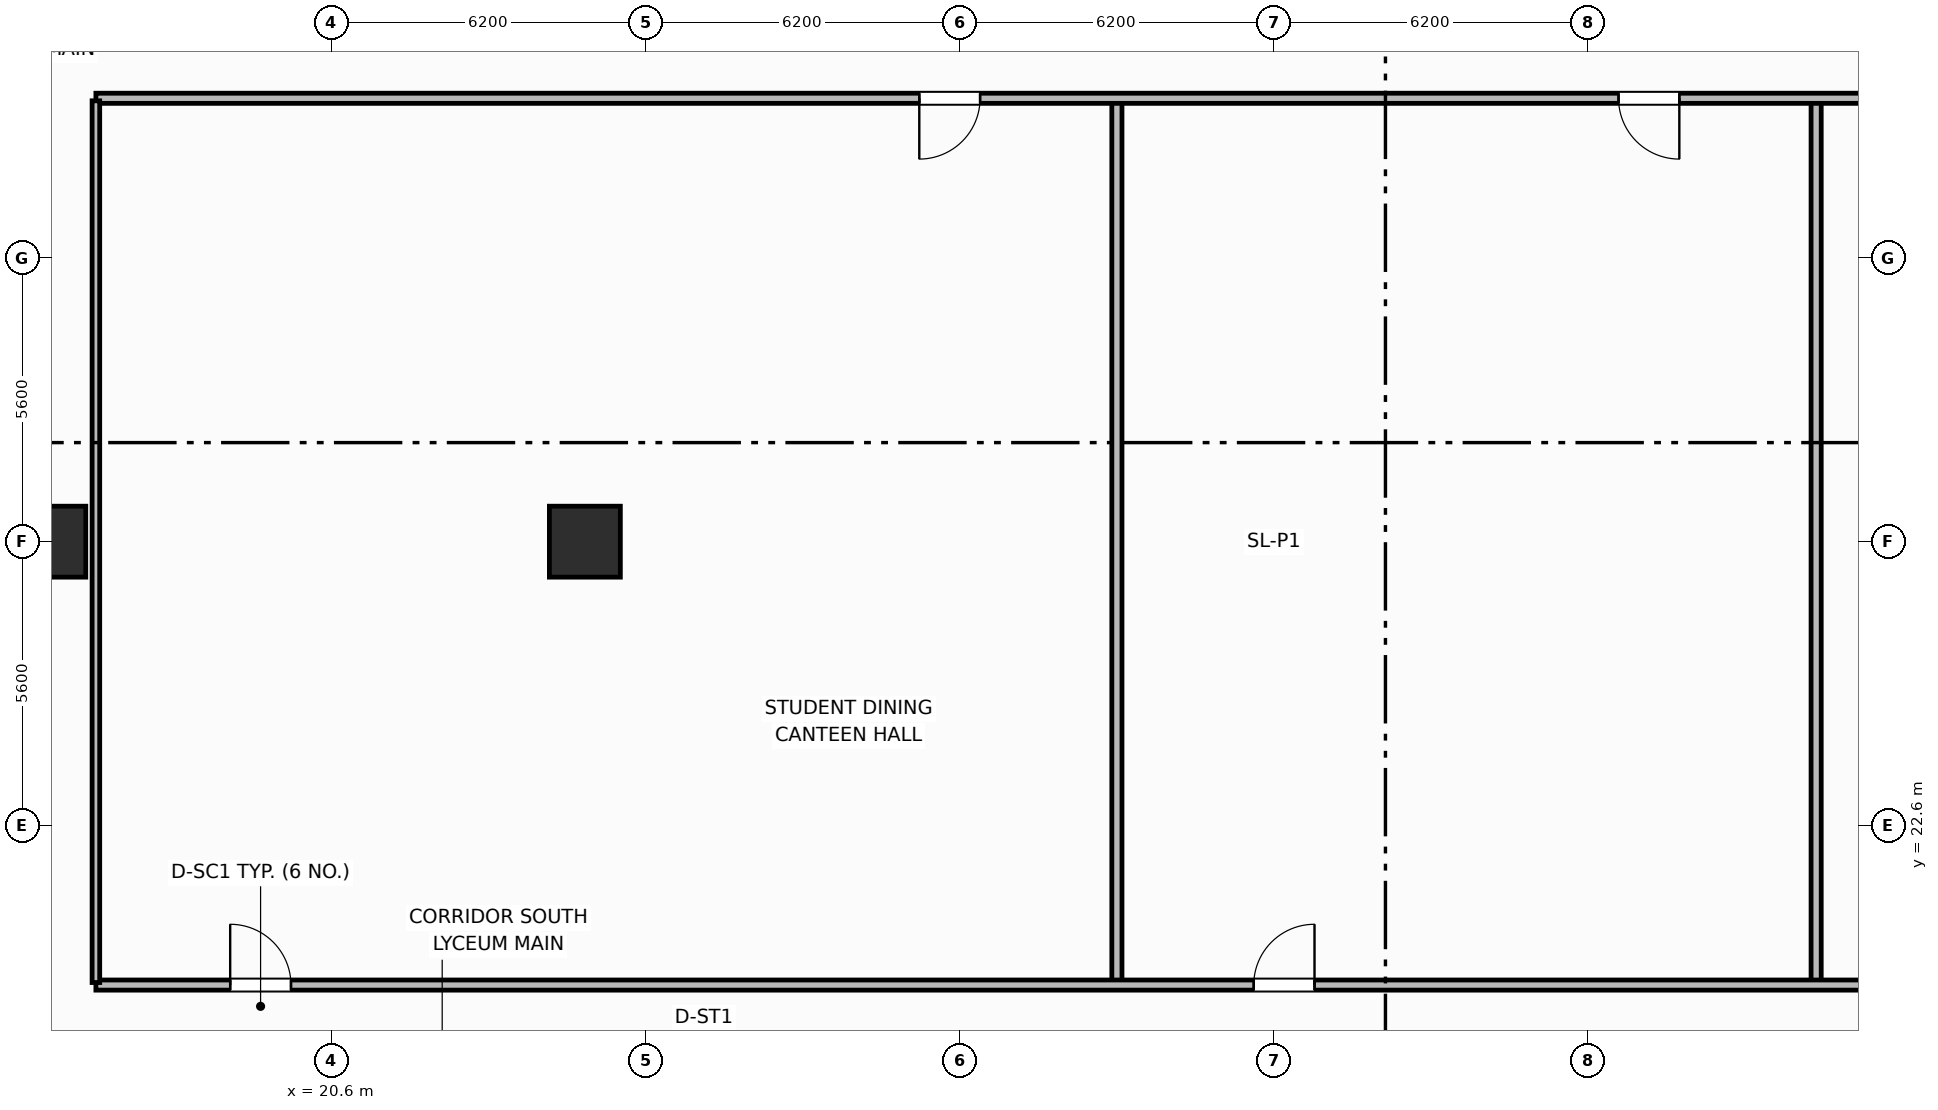
"""IFC4 building model, lengths in metres.
Left out: names, types, materials, properties, quantities, classifications, styles, units other than length and angle.
Written with IfcOpenShell. Run it as: python <this file> out.ifc"""

import sys

from ifc_helpers import new_model, si_unit, direction, frame, frame_2d, origin, origin_2d, place, context, subcontext, project, spatial, rectangle, extrude, element, fill, save


model = new_model("IFC4")
c1 = context("Model", 3, precision=1e-05, world=origin(), true_north=direction((0.0, 1.0)))
c2 = subcontext(c1, "Body", "Model", "MODEL_VIEW")
j1 = project(units=[si_unit("LENGTHUNIT", "METRE"), si_unit("PLANEANGLEUNIT", "RADIAN")], contexts=[c1])
p1 = place(None, origin())
s1 = spatial("IfcSite", under=j1, at=p1, CompositionType="ELEMENT")
p2 = place(p1, origin())
s2 = spatial("IfcBuilding", under=s1, at=p2, CompositionType="ELEMENT")
p3 = place(p2, frame((0.0, 0.0, 6.6)))
s3 = spatial("IfcBuildingStorey", under=s2, at=p3, CompositionType="ELEMENT", Elevation=6.6)
for number, where, z_axis, x_axis in (
    (1, (25.6, 28.2, 0.0), (0.0, 0.0, 1.0), (1.0, 0.0, 0.0)),
    (2, (15.05, 28.2, 0.0), (0.0, 0.0, 1.0), (1.0, 0.0, 0.0)),
):
    element("IfcColumn", number, at=place(p3, frame(where, z_axis=z_axis, x_axis=x_axis)), inside=s3, PredefinedType="COLUMN", context=c2, shape_type="SweptSolid", body=[
        extrude(rectangle(XDim=1.4, YDim=1.4, at=origin_2d()), origin(), (0.0, 0.0, 1.0), 4.5),
    ])
for number, where, z_axis, x_axis in (
    (3, (36.1, 19.5, 0.0), (0.0, 0.0, 1.0), (0.0, 1.0, 0.0)),
    (4, (49.9, 19.5, 0.0), (0.0, 0.0, 1.0), (0.0, 1.0, 0.0)),
):
    element("IfcWall", number, at=place(p3, frame(where, z_axis=z_axis, x_axis=x_axis)), inside=s3, PredefinedType="PARTITIONING", context=c2, shape_type="SweptSolid", body=[
        extrude(rectangle(XDim=17.4, YDim=0.2, at=frame_2d((8.7, 0.0))), origin(), (0.0, 0.0, 1.0), 3.42),
    ])
p4 = place(p3, frame((15.95, 19.45, 0.0), z_axis=(0.0, 0.0, 1.0), x_axis=(1.0, 0.0, 0.0)))
e5 = element("IfcWall", 5, at=p4, inside=s3, PredefinedType="PARTITIONING", context=c2, shape_type="SweptSolid", body=[
    extrude(rectangle(XDim=46.5, YDim=0.2, at=frame_2d((23.25, 0.0))), origin(), (0.0, 0.0, 1.0), 3.42),
])
p5 = place(p4, frame((2.65, 0.0, 0.0)))
e6 = element("IfcOpeningElement", 6, at=p5, cuts=e5, PredefinedType="OPENING", context=c2, shape_type="SweptSolid", body=[
    extrude(rectangle(XDim=1.2, YDim=2.15, at=frame_2d((0.6, 1.075))), frame((0.0, 0.11, 0.0), z_axis=(0.0, -1.0, 0.0), x_axis=(1.0, 0.0, 0.0)), (0.0, 0.0, 1.0), 0.22),
])
p6 = place(p4, frame((22.85, 0.0, 0.0)))
e7 = element("IfcOpeningElement", 7, at=p6, cuts=e5, PredefinedType="OPENING", context=c2, shape_type="SweptSolid", body=[
    extrude(rectangle(XDim=1.2, YDim=2.15, at=frame_2d((0.6, 1.075))), frame((0.0, 0.11, 0.0), z_axis=(0.0, -1.0, 0.0), x_axis=(1.0, 0.0, 0.0)), (0.0, 0.0, 1.0), 0.22),
])
p7 = place(p4, frame((36.65, 0.0, 0.0)))
e8 = element("IfcOpeningElement", 8, at=p7, cuts=e5, PredefinedType="OPENING", context=c2, shape_type="SweptSolid", body=[
    extrude(rectangle(XDim=1.2, YDim=2.15, at=frame_2d((0.6, 1.075))), frame((0.0, 0.11, 0.0), z_axis=(0.0, -1.0, 0.0), x_axis=(1.0, 0.0, 0.0)), (0.0, 0.0, 1.0), 0.22),
])
p8 = place(p3, frame((62.45, 36.95, 0.0), z_axis=(0.0, 0.0, 1.0), x_axis=(-1.0, 0.0, 0.0)))
e9 = element("IfcWall", 9, at=p8, inside=s3, PredefinedType="PARTITIONING", context=c2, shape_type="SweptSolid", body=[
    extrude(rectangle(XDim=46.5, YDim=0.2, at=frame_2d((23.25, 0.0))), origin(), (0.0, 0.0, 1.0), 3.42),
])
p9 = place(p8, frame((29.05, 0.0, 0.0)))
e10 = element("IfcOpeningElement", 10, at=p9, cuts=e9, PredefinedType="OPENING", context=c2, shape_type="SweptSolid", body=[
    extrude(rectangle(XDim=1.2, YDim=2.15, at=frame_2d((0.6, 1.075))), frame((0.0, 0.11, 0.0), z_axis=(0.0, -1.0, 0.0), x_axis=(1.0, 0.0, 0.0)), (0.0, 0.0, 1.0), 0.22),
])
p10 = place(p8, frame((15.25, 0.0, 0.0)))
e11 = element("IfcOpeningElement", 11, at=p10, cuts=e9, PredefinedType="OPENING", context=c2, shape_type="SweptSolid", body=[
    extrude(rectangle(XDim=1.2, YDim=2.15, at=frame_2d((0.6, 1.075))), frame((0.0, 0.11, 0.0), z_axis=(0.0, -1.0, 0.0), x_axis=(1.0, 0.0, 0.0)), (0.0, 0.0, 1.0), 0.22),
])
p11 = place(p8, frame((2.65, 0.0, 0.0)))
e12 = element("IfcOpeningElement", 12, at=p11, cuts=e9, PredefinedType="OPENING", context=c2, shape_type="SweptSolid", body=[
    extrude(rectangle(XDim=1.2, YDim=2.15, at=frame_2d((0.6, 1.075))), frame((0.0, 0.11, 0.0), z_axis=(0.0, -1.0, 0.0), x_axis=(1.0, 0.0, 0.0)), (0.0, 0.0, 1.0), 0.22),
])
p12 = place(p3, frame((15.95, 19.5, 0.0), z_axis=(0.0, 0.0, 1.0), x_axis=(0.0, 1.0, 0.0)))
e13 = element("IfcWall", 13, at=p12, inside=s3, PredefinedType="PARTITIONING", context=c2, shape_type="SweptSolid", body=[
    extrude(rectangle(XDim=17.4, YDim=0.15, at=frame_2d((8.7, 0.0))), origin(), (0.0, 0.0, 1.0), 3.42),
])
p13 = place(p5, origin())
e14 = element("IfcDoor", 14, at=p13, inside=s3, OperationType="SINGLE_SWING_LEFT", PredefinedType="DOOR", context=c2, shape_type="SweptSolid", body=[
    extrude(rectangle(XDim=1.2, YDim=2.15, at=frame_2d((0.6, 1.075))), frame((0.0, 0.025, 0.0), z_axis=(0.0, -1.0, 0.0), x_axis=(1.0, 0.0, 0.0)), (0.0, 0.0, 1.0), 0.05),
])
fill(e6, e14)
p14 = place(p6, origin())
e15 = element("IfcDoor", 15, at=p14, inside=s3, OperationType="SINGLE_SWING_RIGHT", PredefinedType="DOOR", context=c2, shape_type="SweptSolid", body=[
    extrude(rectangle(XDim=1.2, YDim=2.15, at=frame_2d((0.6, 1.075))), frame((0.0, 0.025, 0.0), z_axis=(0.0, -1.0, 0.0), x_axis=(1.0, 0.0, 0.0)), (0.0, 0.0, 1.0), 0.05),
])
fill(e7, e15)
p15 = place(p9, origin())
e16 = element("IfcDoor", 16, at=p15, inside=s3, OperationType="SINGLE_SWING_RIGHT", PredefinedType="DOOR", context=c2, shape_type="SweptSolid", body=[
    extrude(rectangle(XDim=1.2, YDim=2.15, at=frame_2d((0.6, 1.075))), frame((0.0, 0.025, 0.0), z_axis=(0.0, -1.0, 0.0), x_axis=(1.0, 0.0, 0.0)), (0.0, 0.0, 1.0), 0.05),
])
fill(e10, e16)
p16 = place(p10, origin())
e17 = element("IfcDoor", 17, at=p16, inside=s3, OperationType="SINGLE_SWING_LEFT", PredefinedType="DOOR", context=c2, shape_type="SweptSolid", body=[
    extrude(rectangle(XDim=1.2, YDim=2.15, at=frame_2d((0.6, 1.075))), frame((0.0, 0.025, 0.0), z_axis=(0.0, -1.0, 0.0), x_axis=(1.0, 0.0, 0.0)), (0.0, 0.0, 1.0), 0.05),
])
fill(e11, e17)
save(model, sys.argv[1])
